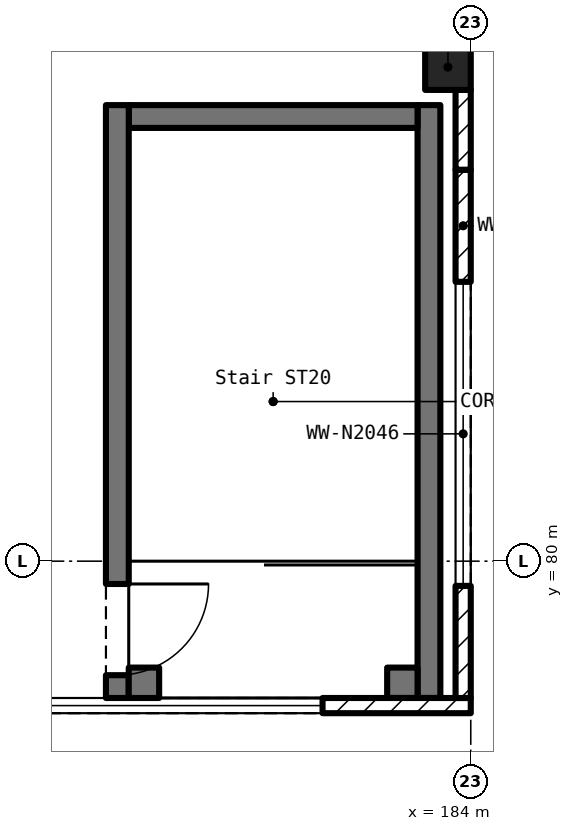
"""IFC4 building model, lengths in metres.
Left out: names, types, materials, properties, quantities, classifications, styles, units other than length and angle.
Written with IfcOpenShell. Run it as: python <this file> out.ifc"""

import sys

from ifc_helpers import new_model, si_unit, direction, frame, frame_2d, origin, origin_2d, place, context, subcontext, project, spatial, rectangle, extrude, element, fill, save


model = new_model("IFC4")
c1 = context("Model", 3, precision=1e-05, world=origin(), true_north=direction((0.0, 1.0)))
c2 = subcontext(c1, "Body", "Model", "MODEL_VIEW")
j1 = project(units=[si_unit("LENGTHUNIT", "METRE"), si_unit("PLANEANGLEUNIT", "RADIAN")], contexts=[c1])
p1 = place(None, origin())
s1 = spatial("IfcSite", under=j1, at=p1, CompositionType="ELEMENT")
p2 = place(p1, origin())
s2 = spatial("IfcBuilding", under=s1, at=p2, CompositionType="ELEMENT")
p3 = place(p2, frame((0.0, 0.0, 17.0)))
s3 = spatial("IfcBuildingStorey", under=s2, at=p3, CompositionType="ELEMENT", Elevation=17.0)
p4 = place(p3, frame((183.7, 86.5, 0.0), z_axis=(0.0, 0.0, 1.0), x_axis=(1.0, 0.0, 0.0)))
e1 = element("IfcColumn", 1, at=p4, inside=s3, PredefinedType="COLUMN", context=c2, shape_type="SweptSolid", body=[
    extrude(rectangle(XDim=0.6, YDim=0.6, at=origin_2d()), origin(), (0.0, 0.0, 1.0), 5.5),
])
p5 = place(p3, frame((176.1, 78.1, 0.0), z_axis=(0.0, 0.0, 1.0), x_axis=(1.0, 0.0, 0.0)))
e2 = element("IfcWall", 2, at=p5, inside=s3, PredefinedType="SOLIDWALL", context=c2, shape_type="SweptSolid", body=[
    extrude(rectangle(XDim=7.9, YDim=0.2, at=frame_2d((3.95, 0.0))), origin(), (0.0, 0.0, 1.0), 4.45),
])
p6 = place(p5, frame((1.95, 0.0, 1.0)))
e3 = element("IfcOpeningElement", 3, at=p6, cuts=e2, PredefinedType="OPENING", context=c2, shape_type="SweptSolid", body=[
    extrude(rectangle(XDim=4.0, YDim=1.8, at=frame_2d((2.0, 0.9))), frame((0.0, 0.112, 0.0), z_axis=(0.0, -1.0, 0.0), x_axis=(1.0, 0.0, 0.0)), (0.0, 0.0, 1.0), 0.224),
])
p7 = place(p3, frame((183.9, 78.2, 0.0), z_axis=(0.0, 0.0, 1.0), x_axis=(0.0, 1.0, 0.0)))
e4 = element("IfcWall", 4, at=p7, inside=s3, PredefinedType="SOLIDWALL", context=c2, shape_type="SweptSolid", body=[
    extrude(rectangle(XDim=6.95, YDim=0.2, at=frame_2d((3.475, 0.0))), origin(), (0.0, 0.0, 1.0), 4.45),
])
p8 = place(p7, frame((1.475, 0.0, 1.0)))
e5 = element("IfcOpeningElement", 5, at=p8, cuts=e4, PredefinedType="OPENING", context=c2, shape_type="SweptSolid", body=[
    extrude(rectangle(XDim=4.0, YDim=1.8, at=frame_2d((2.0, 0.9))), frame((0.0, 0.112, 0.0), z_axis=(0.0, -1.0, 0.0), x_axis=(1.0, 0.0, 0.0)), (0.0, 0.0, 1.0), 0.224),
])
p9 = place(p3, frame((183.9, 85.15, 0.0), z_axis=(0.0, 0.0, 1.0), x_axis=(0.0, 1.0, 0.0)))
e6 = element("IfcWall", 6, at=p9, inside=s3, PredefinedType="SOLIDWALL", context=c2, shape_type="SweptSolid", body=[
    extrude(rectangle(XDim=1.05, YDim=0.2, at=frame_2d((0.525, 0.0))), origin(), (0.0, 0.0, 1.0), 4.45),
])
p10 = place(p3, frame((183.45, 78.2, 0.0), z_axis=(0.0, 0.0, 1.0), x_axis=(0.0, 1.0, 0.0)))
e7 = element("IfcWall", 7, at=p10, inside=s3, PredefinedType="SOLIDWALL", context=c2, shape_type="SweptSolid", body=[
    extrude(rectangle(XDim=7.8, YDim=0.3, at=frame_2d((3.9, 0.0))), origin(), (0.0, 0.0, 1.0), 5.25),
])
p11 = place(p3, frame((183.3, 85.85, 0.0), z_axis=(0.0, 0.0, 1.0), x_axis=(-1.0, 0.0, 0.0)))
e8 = element("IfcWall", 8, at=p11, inside=s3, PredefinedType="SOLIDWALL", context=c2, shape_type="SweptSolid", body=[
    extrude(rectangle(XDim=3.8, YDim=0.3, at=frame_2d((1.9, 0.0))), origin(), (0.0, 0.0, 1.0), 5.25),
])
p12 = place(p3, frame((179.35, 86.0, 0.0), z_axis=(0.0, 0.0, 1.0), x_axis=(0.0, -1.0, 0.0)))
e9 = element("IfcWall", 9, at=p12, inside=s3, PredefinedType="SOLIDWALL", context=c2, shape_type="SweptSolid", body=[
    extrude(rectangle(XDim=7.8, YDim=0.3, at=frame_2d((3.9, 0.0))), origin(), (0.0, 0.0, 1.0), 5.25),
])
p13 = place(p12, frame((6.3, 0.0, 0.0)))
e10 = element("IfcOpeningElement", 10, at=p13, cuts=e9, PredefinedType="OPENING", context=c2, shape_type="SweptSolid", body=[
    extrude(rectangle(XDim=1.2, YDim=2.1, at=frame_2d((0.6, 1.05))), frame((0.0, 0.162, 0.0), z_axis=(0.0, -1.0, 0.0), x_axis=(1.0, 0.0, 0.0)), (0.0, 0.0, 1.0), 0.324),
])
p14 = place(p3, frame((179.5, 78.4, 0.0), z_axis=(0.0, 0.0, 1.0), x_axis=(1.0, 0.0, 0.0)))
e11 = element("IfcWall", 11, at=p14, inside=s3, PredefinedType="SOLIDWALL", context=c2, shape_type="SweptSolid", body=[
    extrude(rectangle(XDim=0.4, YDim=0.4, at=frame_2d((0.2, 0.0))), origin(), (0.0, 0.0, 1.0), 5.25),
])
p15 = place(p3, frame((182.9, 78.4, 0.0), z_axis=(0.0, 0.0, 1.0), x_axis=(1.0, 0.0, 0.0)))
e12 = element("IfcWall", 12, at=p15, inside=s3, PredefinedType="SOLIDWALL", context=c2, shape_type="SweptSolid", body=[
    extrude(rectangle(XDim=0.4, YDim=0.4, at=frame_2d((0.2, 0.0))), origin(), (0.0, 0.0, 1.0), 5.25),
])
p16 = place(p6, origin())
e13 = element("IfcWindow", 13, at=p16, inside=s3, PartitioningType="DOUBLE_PANEL_VERTICAL", PredefinedType="WINDOW", context=c2, shape_type="SweptSolid", body=[
    extrude(rectangle(XDim=4.0, YDim=1.8, at=frame_2d((2.0, 0.9))), frame((0.0, 0.03, 0.0), z_axis=(0.0, -1.0, 0.0), x_axis=(1.0, 0.0, 0.0)), (0.0, 0.0, 1.0), 0.06),
])
fill(e3, e13)
p17 = place(p8, origin())
e14 = element("IfcWindow", 14, at=p17, inside=s3, PartitioningType="DOUBLE_PANEL_VERTICAL", PredefinedType="WINDOW", context=c2, shape_type="SweptSolid", body=[
    extrude(rectangle(XDim=4.0, YDim=1.8, at=frame_2d((2.0, 0.9))), frame((0.0, 0.03, 0.0), z_axis=(0.0, -1.0, 0.0), x_axis=(1.0, 0.0, 0.0)), (0.0, 0.0, 1.0), 0.06),
])
fill(e5, e14)
p18 = place(p13, origin())
e15 = element("IfcDoor", 15, at=p18, inside=s3, OperationType="SINGLE_SWING_LEFT", PredefinedType="DOOR", context=c2, shape_type="SweptSolid", body=[
    extrude(rectangle(XDim=1.2, YDim=2.1, at=frame_2d((0.6, 1.05))), frame((0.0, 0.025, 0.0), z_axis=(0.0, -1.0, 0.0), x_axis=(1.0, 0.0, 0.0)), (0.0, 0.0, 1.0), 0.05),
])
fill(e10, e15)
save(model, sys.argv[1])
